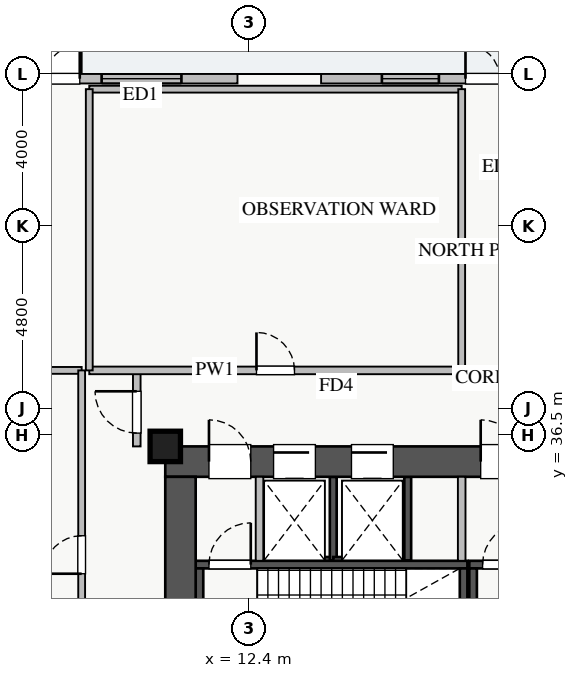
"""IFC4 building model, lengths in metres.
Left out: names, types, materials, properties, quantities, classifications, styles, units other than length and angle.
Written with IfcOpenShell. Run it as: python <this file> out.ifc"""

import sys

from ifc_helpers import new_model, si_unit, direction, frame, frame_2d, origin, origin_2d, place, context, subcontext, project, spatial, rectangle, extrude, source, transform, mapped, element, fill, save


model = new_model("IFC4")
c1 = context("Model", 3, precision=1e-05, world=origin(), true_north=direction((0.0, 1.0)))
c2 = subcontext(c1, "Body", "Model", "MODEL_VIEW")
j1 = project(units=[si_unit("LENGTHUNIT", "METRE"), si_unit("PLANEANGLEUNIT", "RADIAN")], contexts=[c1])
p1 = place(None, origin())
s1 = spatial("IfcSite", under=j1, at=p1, CompositionType="ELEMENT")
p2 = place(p1, origin())
s2 = spatial("IfcBuilding", under=s1, at=p2, CompositionType="ELEMENT")
p3 = place(p2, origin())
s3 = spatial("IfcBuildingStorey", under=s2, at=p3, CompositionType="ELEMENT", Elevation=0.0)
p4 = place(p3, frame((12.68, 33.2, 0.0), z_axis=(0.0, 0.0, 1.0), x_axis=(1.0, 0.0, 0.0)))
e1 = element("IfcWall", 1, at=p4, inside=s3, PredefinedType="SHEAR", context=c2, shape_type="SweptSolid", body=[
    extrude(rectangle(XDim=1.94, YDim=0.18, at=frame_2d((0.97, 0.0))), origin(), (0.0, 0.0, 1.0), 4.78),
])
p5 = place(p3, frame((14.62, 33.2, 0.0), z_axis=(0.0, 0.0, 1.0), x_axis=(0.0, 1.0, 0.0)))
e2 = element("IfcWall", 2, at=p5, inside=s3, PredefinedType="SHEAR", context=c2, shape_type="SweptSolid", body=[
    extrude(rectangle(XDim=2.2, YDim=0.18, at=frame_2d((1.1, 0.0))), origin(), (0.0, 0.0, 1.0), 4.78),
])
p6 = place(p3, frame((14.62, 33.2, 0.0), z_axis=(0.0, 0.0, 1.0), x_axis=(1.0, 0.0, 0.0)))
e3 = element("IfcWall", 3, at=p6, inside=s3, PredefinedType="SHEAR", context=c2, shape_type="SweptSolid", body=[
    extrude(rectangle(XDim=1.96, YDim=0.18, at=frame_2d((0.98, 0.0))), origin(), (0.0, 0.0, 1.0), 4.78),
])
p7 = place(p3, frame((16.58, 33.2, 0.0), z_axis=(0.0, 0.0, 1.0), x_axis=(0.0, 1.0, 0.0)))
e4 = element("IfcWall", 4, at=p7, inside=s3, PredefinedType="SHEAR", context=c2, shape_type="SweptSolid", body=[
    extrude(rectangle(XDim=2.2, YDim=0.18, at=frame_2d((1.1, 0.0))), origin(), (0.0, 0.0, 1.0), 4.78),
])
p8 = place(p3, frame((11.0, 33.09, 0.0), z_axis=(0.0, 0.0, 1.0), x_axis=(1.0, 0.0, 0.0)))
e5 = element("IfcWall", 5, at=p8, inside=s3, PredefinedType="SHEAR", context=c2, shape_type="SweptSolid", body=[
    extrude(rectangle(XDim=7.15, YDim=0.2, at=frame_2d((3.575, 0.0))), origin(), (0.0, 0.0, 1.0), 5.0),
])
p9 = place(p8, frame((0.35, 0.0, 0.0)))
e6 = element("IfcOpeningElement", 6, at=p9, cuts=e5, PredefinedType="OPENING", context=c2, shape_type="SweptSolid", body=[
    extrude(rectangle(XDim=1.1, YDim=2.05, at=frame_2d((0.55, 1.025))), frame((0.0, 0.11, 0.0), z_axis=(0.0, -1.0, 0.0), x_axis=(1.0, 0.0, 0.0)), (0.0, 0.0, 1.0), 0.22),
])
for number, where, z_axis, x_axis in (
    (7, (11.1, 30.05, 0.0), (0.0, 0.0, 1.0), (0.0, 1.0, 0.0)),
    (8, (18.05, 30.05, 0.0), (0.0, 0.0, 1.0), (0.0, 1.0, 0.0)),
):
    element("IfcWall", number, at=place(p3, frame(where, z_axis=z_axis, x_axis=x_axis)), inside=s3, PredefinedType="SHEAR", context=c2, shape_type="SweptSolid", body=[
        extrude(rectangle(XDim=2.94, YDim=0.2, at=frame_2d((1.47, 0.0))), origin(), (0.0, 0.0, 1.0), 5.0),
    ])
p10 = place(p3, frame((18.2, 33.09, 0.0), z_axis=(0.0, 0.0, 1.0), x_axis=(1.0, 0.0, 0.0)))
e9 = element("IfcWall", 9, at=p10, inside=s3, PredefinedType="SHEAR", context=c2, shape_type="SweptSolid", body=[
    extrude(rectangle(XDim=7.15, YDim=0.2, at=frame_2d((3.575, 0.0))), origin(), (0.0, 0.0, 1.0), 5.0),
])
p11 = place(p10, frame((0.35, 0.0, 0.0)))
e10 = element("IfcOpeningElement", 10, at=p11, cuts=e9, PredefinedType="OPENING", context=c2, shape_type="SweptSolid", body=[
    extrude(rectangle(XDim=1.1, YDim=2.05, at=frame_2d((0.55, 1.025))), frame((0.0, 0.11, 0.0), z_axis=(0.0, -1.0, 0.0), x_axis=(1.0, 0.0, 0.0)), (0.0, 0.0, 1.0), 0.22),
])
p12 = place(p3, frame((18.3, 30.05, 0.0), z_axis=(0.0, 0.0, 1.0), x_axis=(0.0, 1.0, 0.0)))
e11 = element("IfcWall", 11, at=p12, inside=s3, PredefinedType="SHEAR", context=c2, shape_type="SweptSolid", body=[
    extrude(rectangle(XDim=2.94, YDim=0.2, at=frame_2d((1.47, 0.0))), origin(), (0.0, 0.0, 1.0), 5.0),
])
p13 = place(p3, frame((10.2, 35.8, 0.0), z_axis=(0.0, 0.0, 1.0), x_axis=(1.0, 0.0, 0.0)))
e12 = element("IfcWall", 12, at=p13, inside=s3, PredefinedType="SHEAR", context=c2, shape_type="SweptSolid", body=[
    extrude(rectangle(XDim=17.6, YDim=0.8, at=frame_2d((8.8, 0.0))), origin(), (0.0, 0.0, 1.0), 5.0),
])
p14 = place(p13, frame((1.15, 0.0, 0.0)))
e13 = element("IfcOpeningElement", 13, at=p14, cuts=e12, PredefinedType="OPENING", context=c2, shape_type="SweptSolid", body=[
    extrude(rectangle(XDim=1.1, YDim=2.05, at=frame_2d((0.55, 1.025))), frame((0.0, 0.41, 0.0), z_axis=(0.0, -1.0, 0.0), x_axis=(1.0, 0.0, 0.0)), (0.0, 0.0, 1.0), 0.82),
])
p15 = place(p13, frame((8.3, 0.0, 0.0)))
e14 = element("IfcOpeningElement", 14, at=p15, cuts=e12, PredefinedType="OPENING", context=c2, shape_type="SweptSolid", body=[
    extrude(rectangle(XDim=1.1, YDim=2.05, at=frame_2d((0.55, 1.025))), frame((0.0, 0.41, 0.0), z_axis=(0.0, -1.0, 0.0), x_axis=(1.0, 0.0, 0.0)), (0.0, 0.0, 1.0), 0.82),
])
p16 = place(p13, frame((10.05, 0.0, 0.0)))
e15 = element("IfcOpeningElement", 15, at=p16, cuts=e12, PredefinedType="OPENING", context=c2, shape_type="SweptSolid", body=[
    extrude(rectangle(XDim=1.1, YDim=2.05, at=frame_2d((0.55, 1.025))), frame((0.0, 0.41, 0.0), z_axis=(0.0, -1.0, 0.0), x_axis=(1.0, 0.0, 0.0)), (0.0, 0.0, 1.0), 0.82),
])
p17 = place(p13, frame((4.9, 0.0, 0.0)))
e16 = element("IfcOpeningElement", 16, at=p17, cuts=e12, PredefinedType="OPENING", context=c2, shape_type="SweptSolid", body=[
    extrude(rectangle(XDim=1.1, YDim=2.05, at=frame_2d((0.55, 1.025))), frame((0.0, 0.41, 0.0), z_axis=(0.0, -1.0, 0.0), x_axis=(1.0, 0.0, 0.0)), (0.0, 0.0, 1.0), 0.82),
])
p18 = place(p13, frame((2.85, 0.0, 0.0)))
e17 = element("IfcOpeningElement", 17, at=p18, cuts=e12, PredefinedType="OPENING", context=c2, shape_type="SweptSolid", body=[
    extrude(rectangle(XDim=1.1, YDim=2.05, at=frame_2d((0.55, 1.025))), frame((0.0, 0.41, 0.0), z_axis=(0.0, -1.0, 0.0), x_axis=(1.0, 0.0, 0.0)), (0.0, 0.0, 1.0), 0.82),
])
p19 = place(p13, frame((14.74, 0.0, 0.0)))
e18 = element("IfcOpeningElement", 18, at=p19, cuts=e12, PredefinedType="OPENING", context=c2, shape_type="SweptSolid", body=[
    extrude(rectangle(XDim=1.0, YDim=2.05, at=frame_2d((0.5, 1.025))), frame((0.0, 0.41, 0.0), z_axis=(0.0, -1.0, 0.0), x_axis=(1.0, 0.0, 0.0)), (0.0, 0.0, 1.0), 0.82),
])
p20 = place(p13, frame((12.585, 0.0, 0.0)))
e19 = element("IfcOpeningElement", 19, at=p20, cuts=e12, PredefinedType="OPENING", context=c2, shape_type="SweptSolid", body=[
    extrude(rectangle(XDim=1.0, YDim=2.05, at=frame_2d((0.5, 1.025))), frame((0.0, 0.41, 0.0), z_axis=(0.0, -1.0, 0.0), x_axis=(1.0, 0.0, 0.0)), (0.0, 0.0, 1.0), 0.82),
])
p21 = place(p3, frame((10.6, 29.8, 0.0), z_axis=(0.0, 0.0, 1.0), x_axis=(0.0, 1.0, 0.0)))
e20 = element("IfcWall", 20, at=p21, inside=s3, PredefinedType="SHEAR", context=c2, shape_type="SweptSolid", body=[
    extrude(rectangle(XDim=5.6, YDim=0.8, at=frame_2d((2.8, 0.0))), origin(), (0.0, 0.0, 1.0), 5.0),
])
m1 = source(origin(), c2, "Body", "SweptSolid", [
    extrude(rectangle(XDim=0.8, YDim=0.8, at=origin_2d()), origin(), (0.0, 0.0, 1.0), 5.0),
])
p22 = place(p3, frame((10.2, 36.2, 0.0), z_axis=(0.0, 0.0, 1.0), x_axis=(1.0, 0.0, 0.0)))
e21 = element("IfcColumn", 21, at=p22, inside=s3, PredefinedType="PILASTER", context=c2, shape_type="MappedRepresentation", body=[
    mapped(m1, transform((0.0, 0.0, 0.0), x_axis=(1.0, 0.0, 0.0), y_axis=(0.0, 1.0, 0.0), z_axis=(0.0, 0.0, 1.0), scale=1.0)),
])
p23 = place(p3, frame((2.0, 45.875, 0.0), z_axis=(0.0, 0.0, 1.0), x_axis=(1.0, 0.0, 0.0)))
e22 = element("IfcWall", 22, at=p23, inside=s3, PredefinedType="STANDARD", context=c2, shape_type="SweptSolid", body=[
    extrude(rectangle(XDim=10.1, YDim=0.25, at=frame_2d((5.05, 0.0))), origin(), (0.0, 0.0, 1.0), 4.32),
])
p24 = place(p23, frame((4.15, 0.0, 0.0)))
e23 = element("IfcOpeningElement", 23, at=p24, cuts=e22, PredefinedType="OPENING", context=c2, shape_type="SweptSolid", body=[
    extrude(rectangle(XDim=1.8, YDim=2.2, at=frame_2d((0.9, 1.1))), frame((0.0, 0.135, 0.0), z_axis=(0.0, -1.0, 0.0), x_axis=(1.0, 0.0, 0.0)), (0.0, 0.0, 1.0), 0.27),
])
p25 = place(p23, frame((1.775, 0.0, 0.9)))
e24 = element("IfcOpeningElement", 24, at=p25, cuts=e22, PredefinedType="OPENING", context=c2, shape_type="SweptSolid", body=[
    extrude(rectangle(XDim=1.5, YDim=1.45, at=frame_2d((0.75, 0.725))), frame((0.0, 0.135, 0.0), z_axis=(0.0, -1.0, 0.0), x_axis=(1.0, 0.0, 0.0)), (0.0, 0.0, 1.0), 0.27),
])
p26 = place(p23, frame((6.525, 0.0, 0.9)))
e25 = element("IfcOpeningElement", 25, at=p26, cuts=e22, PredefinedType="OPENING", context=c2, shape_type="SweptSolid", body=[
    extrude(rectangle(XDim=2.1, YDim=1.48, at=frame_2d((1.05, 0.74))), frame((0.0, 0.135, 0.0), z_axis=(0.0, -1.0, 0.0), x_axis=(1.0, 0.0, 0.0)), (0.0, 0.0, 1.0), 0.27),
])
p27 = place(p3, frame((14.3, 45.875, 0.0), z_axis=(0.0, 0.0, 1.0), x_axis=(1.0, 0.0, 0.0)))
e26 = element("IfcWall", 26, at=p27, inside=s3, PredefinedType="STANDARD", context=c2, shape_type="SweptSolid", body=[
    extrude(rectangle(XDim=9.4, YDim=0.25, at=frame_2d((4.7, 0.0))), origin(), (0.0, 0.0, 1.0), 4.32),
])
p28 = place(p27, frame((3.8, 0.0, 0.0)))
e27 = element("IfcOpeningElement", 27, at=p28, cuts=e26, PredefinedType="OPENING", context=c2, shape_type="SweptSolid", body=[
    extrude(rectangle(XDim=1.8, YDim=2.2, at=frame_2d((0.9, 1.1))), frame((0.0, 0.135, 0.0), z_axis=(0.0, -1.0, 0.0), x_axis=(1.0, 0.0, 0.0)), (0.0, 0.0, 1.0), 0.27),
])
p29 = place(p27, frame((1.6, 0.0, 0.9)))
e28 = element("IfcOpeningElement", 28, at=p29, cuts=e26, PredefinedType="OPENING", context=c2, shape_type="SweptSolid", body=[
    extrude(rectangle(XDim=1.5, YDim=1.45, at=frame_2d((0.75, 0.725))), frame((0.0, 0.135, 0.0), z_axis=(0.0, -1.0, 0.0), x_axis=(1.0, 0.0, 0.0)), (0.0, 0.0, 1.0), 0.27),
])
p30 = place(p27, frame((6.75, 0.0, 0.9)))
e29 = element("IfcOpeningElement", 29, at=p30, cuts=e26, PredefinedType="OPENING", context=c2, shape_type="SweptSolid", body=[
    extrude(rectangle(XDim=2.1, YDim=1.5, at=frame_2d((1.05, 0.75))), frame((0.0, 0.135, 0.0), z_axis=(0.0, -1.0, 0.0), x_axis=(1.0, 0.0, 0.0)), (0.0, 0.0, 1.0), 0.27),
])
for number, where, z_axis, x_axis in (
    (30, (12.68, 33.19, 0.0), (0.0, 0.0, 1.0), (0.0, 1.0, 0.0)),
    (31, (18.0, 33.19, 0.0), (0.0, 0.0, 1.0), (0.0, 1.0, 0.0)),
):
    element("IfcWall", number, at=place(p3, frame(where, z_axis=z_axis, x_axis=x_axis)), inside=s3, PredefinedType="PARTITIONING", context=c2, shape_type="SweptSolid", body=[
        extrude(rectangle(XDim=2.21, YDim=0.2, at=frame_2d((1.105, 0.0))), origin(), (0.0, 0.0, 1.0), 4.78),
    ])
p31 = place(p3, frame((9.45, 36.2, 0.0), z_axis=(0.0, 0.0, 1.0), x_axis=(0.0, 1.0, 0.0)))
e32 = element("IfcWall", 32, at=p31, inside=s3, PredefinedType="PARTITIONING", context=c2, shape_type="SweptSolid", body=[
    extrude(rectangle(XDim=2.0, YDim=0.2, at=frame_2d((1.0, 0.0))), origin(), (0.0, 0.0, 1.0), 4.78),
])
p32 = place(p31, frame((0.35, 0.0, 0.0)))
e33 = element("IfcOpeningElement", 33, at=p32, cuts=e32, PredefinedType="OPENING", context=c2, shape_type="SweptSolid", body=[
    extrude(rectangle(XDim=1.1, YDim=2.05, at=frame_2d((0.55, 1.025))), frame((0.0, 0.11, 0.0), z_axis=(0.0, -1.0, 0.0), x_axis=(1.0, 0.0, 0.0)), (0.0, 0.0, 1.0), 0.22),
])
p33 = place(p3, frame((8.2, 38.2, 0.0), z_axis=(0.0, 0.0, 1.0), x_axis=(1.0, 0.0, 0.0)))
e34 = element("IfcWall", 34, at=p33, inside=s3, PredefinedType="PARTITIONING", context=c2, shape_type="SweptSolid", body=[
    extrude(rectangle(XDim=9.8, YDim=0.2, at=frame_2d((4.9, 0.0))), origin(), (0.0, 0.0, 1.0), 4.78),
])
p34 = place(p33, frame((4.4, 0.0, 0.0)))
e35 = element("IfcOpeningElement", 35, at=p34, cuts=e34, PredefinedType="OPENING", context=c2, shape_type="SweptSolid", body=[
    extrude(rectangle(XDim=1.0, YDim=2.05, at=frame_2d((0.5, 1.025))), frame((0.0, 0.11, 0.0), z_axis=(0.0, -1.0, 0.0), x_axis=(1.0, 0.0, 0.0)), (0.0, 0.0, 1.0), 0.22),
])
p35 = place(p3, frame((0.4, 38.2, 0.0), z_axis=(0.0, 0.0, 1.0), x_axis=(1.0, 0.0, 0.0)))
e36 = element("IfcWall", 36, at=p35, inside=s3, PredefinedType="PARTITIONING", context=c2, shape_type="SweptSolid", body=[
    extrude(rectangle(XDim=7.6, YDim=0.18, at=frame_2d((3.8, 0.0))), origin(), (0.0, 0.0, 1.0), 4.78),
])
p36 = place(p3, frame((8.0, 28.5, 0.0), z_axis=(0.0, 0.0, 1.0), x_axis=(0.0, 1.0, 0.0)))
e37 = element("IfcWall", 37, at=p36, inside=s3, PredefinedType="PARTITIONING", context=c2, shape_type="SweptSolid", body=[
    extrude(rectangle(XDim=9.7, YDim=0.18, at=frame_2d((4.85, 0.0))), origin(), (0.0, 0.0, 1.0), 4.78),
])
p37 = place(p36, frame((4.35, 0.0, 0.0)))
e38 = element("IfcOpeningElement", 38, at=p37, cuts=e37, PredefinedType="OPENING", context=c2, shape_type="SweptSolid", body=[
    extrude(rectangle(XDim=1.0, YDim=2.05, at=frame_2d((0.5, 1.025))), frame((0.0, 0.1, 0.0), z_axis=(0.0, -1.0, 0.0), x_axis=(1.0, 0.0, 0.0)), (0.0, 0.0, 1.0), 0.2),
])
p38 = place(p3, frame((8.2, 45.6, 0.0), z_axis=(0.0, 0.0, 1.0), x_axis=(1.0, 0.0, 0.0)))
e39 = element("IfcWall", 39, at=p38, inside=s3, PredefinedType="PARTITIONING", context=c2, shape_type="SweptSolid", body=[
    extrude(rectangle(XDim=9.8, YDim=0.18, at=frame_2d((4.9, 0.0))), origin(), (0.0, 0.0, 1.0), 4.78),
])
for number, where, z_axis, x_axis in (
    (40, (8.2, 38.2, 0.0), (0.0, 0.0, 1.0), (0.0, 1.0, 0.0)),
    (41, (18.0, 38.2, 0.0), (0.0, 0.0, 1.0), (0.0, 1.0, 0.0)),
):
    element("IfcWall", number, at=place(p3, frame(where, z_axis=z_axis, x_axis=x_axis)), inside=s3, PredefinedType="PARTITIONING", context=c2, shape_type="SweptSolid", body=[
        extrude(rectangle(XDim=7.4, YDim=0.18, at=frame_2d((3.7, 0.0))), origin(), (0.0, 0.0, 1.0), 4.78),
    ])
m2 = source(origin(), c2, "Body", "SweptSolid", [
    extrude(rectangle(XDim=1.8, YDim=2.2, at=frame_2d((0.9, 1.1))), frame((0.0, 0.025, 0.0), z_axis=(0.0, -1.0, 0.0), x_axis=(1.0, 0.0, 0.0)), (0.0, 0.0, 1.0), 0.05),
])
p39 = place(p24, origin())
e42 = element("IfcDoor", 42, at=p39, inside=s3, OperationType="DOUBLE_DOOR_SINGLE_SWING", PredefinedType="DOOR", context=c2, shape_type="MappedRepresentation", body=[
    mapped(m2, transform((0.0, 0.0, 0.0), x_axis=(1.0, 0.0, 0.0), y_axis=(0.0, 1.0, 0.0), z_axis=(0.0, 0.0, 1.0), scale=1.0)),
])
fill(e23, e42)
m3 = source(origin(), c2, "Body", "SweptSolid", [
    extrude(rectangle(XDim=2.1, YDim=1.48, at=frame_2d((1.05, 0.74))), frame((0.0, 0.03, 0.0), z_axis=(0.0, -1.0, 0.0), x_axis=(1.0, 0.0, 0.0)), (0.0, 0.0, 1.0), 0.06),
])
p40 = place(p26, origin())
e43 = element("IfcWindow", 43, at=p40, inside=s3, PartitioningType="TRIPLE_PANEL_VERTICAL", PredefinedType="WINDOW", context=c2, shape_type="MappedRepresentation", body=[
    mapped(m3, transform((0.0, 0.0, 0.0), x_axis=(1.0, 0.0, 0.0), y_axis=(0.0, 1.0, 0.0), z_axis=(0.0, 0.0, 1.0), scale=1.0)),
])
fill(e25, e43)
p41 = place(p28, origin())
e44 = element("IfcDoor", 44, at=p41, inside=s3, OperationType="DOUBLE_DOOR_SINGLE_SWING", PredefinedType="DOOR", context=c2, shape_type="MappedRepresentation", body=[
    mapped(m2, transform((0.0, 0.0, 0.0), x_axis=(1.0, 0.0, 0.0), y_axis=(0.0, 1.0, 0.0), z_axis=(0.0, 0.0, 1.0), scale=1.0)),
])
fill(e27, e44)
m4 = source(origin(), c2, "Body", "SweptSolid", [
    extrude(rectangle(XDim=1.5, YDim=1.45, at=frame_2d((0.75, 0.725))), frame((0.0, 0.03, 0.0), z_axis=(0.0, -1.0, 0.0), x_axis=(1.0, 0.0, 0.0)), (0.0, 0.0, 1.0), 0.06),
])
p42 = place(p29, origin())
e45 = element("IfcWindow", 45, at=p42, inside=s3, PartitioningType="DOUBLE_PANEL_VERTICAL", PredefinedType="WINDOW", context=c2, shape_type="MappedRepresentation", body=[
    mapped(m4, transform((0.0, 0.0, 0.0), x_axis=(1.0, 0.0, 0.0), y_axis=(0.0, 1.0, 0.0), z_axis=(0.0, 0.0, 1.0), scale=1.0)),
])
fill(e28, e45)
m5 = source(origin(), c2, "Body", "SweptSolid", [
    extrude(rectangle(XDim=1.1, YDim=2.05, at=frame_2d((0.55, 1.025))), frame((0.0, 0.025, 0.0), z_axis=(0.0, -1.0, 0.0), x_axis=(1.0, 0.0, 0.0)), (0.0, 0.0, 1.0), 0.05),
])
p43 = place(p14, origin())
e46 = element("IfcDoor", 46, at=p43, inside=s3, OperationType="SINGLE_SWING_LEFT", PredefinedType="DOOR", context=c2, shape_type="MappedRepresentation", body=[
    mapped(m5, transform((0.0, 0.0, 0.0), x_axis=(1.0, 0.0, 0.0), y_axis=(0.0, 1.0, 0.0), z_axis=(0.0, 0.0, 1.0), scale=1.0)),
])
fill(e13, e46)
p44 = place(p9, origin())
e47 = element("IfcDoor", 47, at=p44, inside=s3, OperationType="SINGLE_SWING_RIGHT", PredefinedType="DOOR", context=c2, shape_type="MappedRepresentation", body=[
    mapped(m5, transform((0.0, 0.0, 0.0), x_axis=(1.0, 0.0, 0.0), y_axis=(0.0, 1.0, 0.0), z_axis=(0.0, 0.0, 1.0), scale=1.0)),
])
fill(e6, e47)
p45 = place(p15, origin())
e48 = element("IfcDoor", 48, at=p45, inside=s3, OperationType="SINGLE_SWING_LEFT", PredefinedType="DOOR", context=c2, shape_type="MappedRepresentation", body=[
    mapped(m5, transform((0.0, 0.0, 0.0), x_axis=(1.0, 0.0, 0.0), y_axis=(0.0, 1.0, 0.0), z_axis=(0.0, 0.0, 1.0), scale=1.0)),
])
fill(e14, e48)
p46 = place(p11, origin())
e49 = element("IfcDoor", 49, at=p46, inside=s3, OperationType="SINGLE_SWING_RIGHT", PredefinedType="DOOR", context=c2, shape_type="MappedRepresentation", body=[
    mapped(m5, transform((0.0, 0.0, 0.0), x_axis=(1.0, 0.0, 0.0), y_axis=(0.0, 1.0, 0.0), z_axis=(0.0, 0.0, 1.0), scale=1.0)),
])
fill(e10, e49)
p47 = place(p17, origin())
e50 = element("IfcDoor", 50, at=p47, inside=s3, OperationType="SLIDING_TO_LEFT", PredefinedType="DOOR", context=c2, shape_type="MappedRepresentation", body=[
    mapped(m5, transform((0.0, 0.0, 0.0), x_axis=(1.0, 0.0, 0.0), y_axis=(0.0, 1.0, 0.0), z_axis=(0.0, 0.0, 1.0), scale=1.0)),
])
fill(e16, e50)
p48 = place(p18, origin())
e51 = element("IfcDoor", 51, at=p48, inside=s3, OperationType="SLIDING_TO_LEFT", PredefinedType="DOOR", context=c2, shape_type="MappedRepresentation", body=[
    mapped(m5, transform((0.0, 0.0, 0.0), x_axis=(1.0, 0.0, 0.0), y_axis=(0.0, 1.0, 0.0), z_axis=(0.0, 0.0, 1.0), scale=1.0)),
])
fill(e17, e51)
p49 = place(p32, origin())
e52 = element("IfcDoor", 52, at=p49, inside=s3, OperationType="SINGLE_SWING_RIGHT", PredefinedType="DOOR", context=c2, shape_type="MappedRepresentation", body=[
    mapped(m5, transform((0.0, 0.0, 0.0), x_axis=(1.0, 0.0, 0.0), y_axis=(0.0, 1.0, 0.0), z_axis=(0.0, 0.0, 1.0), scale=1.0)),
])
fill(e33, e52)
m6 = source(origin(), c2, "Body", "SweptSolid", [
    extrude(rectangle(XDim=1.0, YDim=2.05, at=frame_2d((0.5, 1.025))), frame((0.0, 0.025, 0.0), z_axis=(0.0, -1.0, 0.0), x_axis=(1.0, 0.0, 0.0)), (0.0, 0.0, 1.0), 0.05),
])
p50 = place(p34, origin())
e53 = element("IfcDoor", 53, at=p50, inside=s3, OperationType="SINGLE_SWING_LEFT", PredefinedType="DOOR", context=c2, shape_type="MappedRepresentation", body=[
    mapped(m6, transform((0.0, 0.0, 0.0), x_axis=(1.0, 0.0, 0.0), y_axis=(0.0, 1.0, 0.0), z_axis=(0.0, 0.0, 1.0), scale=1.0)),
])
fill(e35, e53)
p51 = place(p37, origin())
e54 = element("IfcDoor", 54, at=p51, inside=s3, OperationType="SINGLE_SWING_LEFT", PredefinedType="DOOR", context=c2, shape_type="MappedRepresentation", body=[
    mapped(m6, transform((0.0, 0.0, 0.0), x_axis=(1.0, 0.0, 0.0), y_axis=(0.0, 1.0, 0.0), z_axis=(0.0, 0.0, 1.0), scale=1.0)),
])
fill(e38, e54)
save(model, sys.argv[1])
